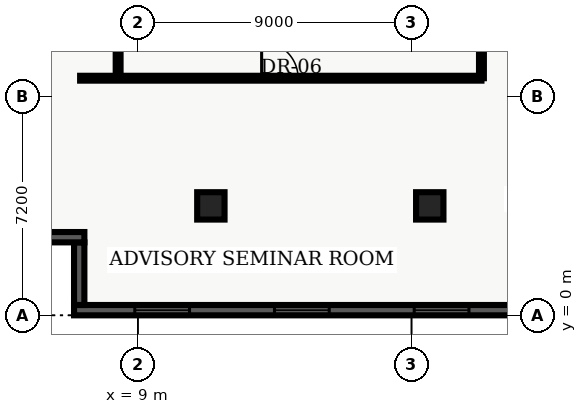
"""IFC4 building model, lengths in metres.
Left out: names, types, materials, properties, quantities, classifications, styles, units other than length and angle.
Written with IfcOpenShell. Run it as: python <this file> out.ifc"""

import sys

from ifc_helpers import new_model, entity, si_unit, converted_unit, direction, frame, origin_with_axes, origin_2d_with_axis, place, context, subcontext, project, spatial, polyline, rectangle, outline, extrude, element, fill, save


model = new_model("IFC4")
c1 = context("Model", 3, precision=1e-05, world=origin_with_axes(), true_north=direction((0.0, 1.0)))
c2 = subcontext(c1, "Body", "Model", "MODEL_VIEW")
j1 = project(units=[si_unit("LENGTHUNIT", "METRE"), converted_unit("PLANEANGLEUNIT", "DEGREE", entity("IfcPlaneAngleMeasure", 0.017), si_unit("PLANEANGLEUNIT", "RADIAN"), dimensions=[0, 0, 0, 0, 0, 0, 0])], contexts=[c1])
p1 = place(None, origin_with_axes())
s1 = spatial("IfcSite", under=j1, at=p1, CompositionType="ELEMENT")
p2 = place(p1, origin_with_axes())
s2 = spatial("IfcBuilding", under=s1, at=p2, CompositionType="ELEMENT")
p3 = place(p2, frame((0.0, 0.0, 240.3), z_axis=(0.0, 0.0, 1.0), x_axis=(1.0, 0.0, 0.0)))
s3 = spatial("IfcBuildingStorey", under=s2, at=p3, CompositionType="ELEMENT", Elevation=240.3)
for number, where, z_axis, x_axis in (
    (1, (11.4, 3.6, 0.0), (0.0, 0.0, 1.0), (1.0, 0.0, 0.0)),
    (2, (18.6, 3.6, 0.0), (0.0, 0.0, 1.0), (1.0, 0.0, 0.0)),
):
    element("IfcColumn", number, at=place(p3, frame(where, z_axis=z_axis, x_axis=x_axis)), inside=s3, PredefinedType="COLUMN", context=c2, shape_type="SweptSolid", body=[
        extrude(rectangle(XDim=0.9, YDim=0.9, at=origin_2d_with_axis()), origin_with_axes(), (0.0, 0.0, 1.0), 3.9),
    ])
p4 = place(p3, frame((7.1, 7.8, 0.0), z_axis=(0.0, 0.0, 1.0), x_axis=(1.0, 0.0, 0.0)))
e3 = element("IfcWall", 3, at=p4, inside=s3, PredefinedType="PARTITIONING", context=c2, shape_type="SweptSolid", body=[
    extrude(outline(polyline([(0.0, -0.08), (13.2, -0.08), (13.2, 0.08), (0.0, 0.08), (0.0, -0.08)])), origin_with_axes(), (0.0, 0.0, 1.0), 2.7),
])
p5 = place(p4, frame((6.57, 0.0, 0.0), z_axis=(0.0, 0.0, 1.0), x_axis=(1.0, 0.0, 0.0)))
e4 = element("IfcOpeningElement", 4, at=p5, cuts=e3, PredefinedType="OPENING", context=c2, shape_type="SweptSolid", body=[
    extrude(rectangle(XDim=1.2, YDim=0.18, at=origin_2d_with_axis()), origin_with_axes(), (0.0, 0.0, 1.0), 2.2),
])
p6 = place(p3, frame((20.3, 7.8, 0.0), z_axis=(0.0, 0.0, 1.0), x_axis=(0.0, 1.0, 0.0)))
e5 = element("IfcWall", 5, at=p6, inside=s3, PredefinedType="PARTITIONING", context=c2, shape_type="SweptSolid", body=[
    extrude(outline(polyline([(0.0, -0.08), (32.7, -0.08), (32.7, 0.08), (0.0, 0.08), (0.0, -0.08)])), origin_with_axes(), (0.0, 0.0, 1.0), 2.7),
])
p7 = place(p6, frame((14.55, 0.0, 0.0), z_axis=(0.0, 0.0, 1.0), x_axis=(1.0, 0.0, 0.0)))
e6 = element("IfcOpeningElement", 6, at=p7, cuts=e5, PredefinedType="OPENING", context=c2, shape_type="SweptSolid", body=[
    extrude(rectangle(XDim=0.9, YDim=0.18, at=origin_2d_with_axis()), origin_with_axes(), (0.0, 0.0, 1.0), 2.15),
])
p8 = place(p6, frame((18.86, 0.0, 0.0), z_axis=(0.0, 0.0, 1.0), x_axis=(1.0, 0.0, 0.0)))
e7 = element("IfcOpeningElement", 7, at=p8, cuts=e5, PredefinedType="OPENING", context=c2, shape_type="SweptSolid", body=[
    extrude(rectangle(XDim=1.0, YDim=0.18, at=origin_2d_with_axis()), origin_with_axes(), (0.0, 0.0, 1.0), 2.15),
])
p9 = place(p6, frame((24.276, 0.0, 0.0), z_axis=(0.0, 0.0, 1.0), x_axis=(1.0, 0.0, 0.0)))
e8 = element("IfcOpeningElement", 8, at=p9, cuts=e5, PredefinedType="OPENING", context=c2, shape_type="SweptSolid", body=[
    extrude(rectangle(XDim=1.0, YDim=0.18, at=origin_2d_with_axis()), origin_with_axes(), (0.0, 0.0, 1.0), 2.15),
])
p10 = place(p6, frame((27.491, 0.0, 0.0), z_axis=(0.0, 0.0, 1.0), x_axis=(1.0, 0.0, 0.0)))
e9 = element("IfcOpeningElement", 9, at=p10, cuts=e5, PredefinedType="OPENING", context=c2, shape_type="SweptSolid", body=[
    extrude(rectangle(XDim=1.0, YDim=0.18, at=origin_2d_with_axis()), origin_with_axes(), (0.0, 0.0, 1.0), 2.15),
])
p11 = place(p6, frame((5.775, 0.0, 0.0), z_axis=(0.0, 0.0, 1.0), x_axis=(1.0, 0.0, 0.0)))
e10 = element("IfcOpeningElement", 10, at=p11, cuts=e5, PredefinedType="OPENING", context=c2, shape_type="SweptSolid", body=[
    extrude(rectangle(XDim=1.05, YDim=0.18, at=origin_2d_with_axis()), origin_with_axes(), (0.0, 0.0, 1.0), 2.15),
])
p12 = place(p3, frame((8.35, 7.8, 0.0), z_axis=(0.0, 0.0, 1.0), x_axis=(0.0, 1.0, 0.0)))
e11 = element("IfcWall", 11, at=p12, inside=s3, PredefinedType="PARTITIONING", context=c2, shape_type="SweptSolid", body=[
    extrude(outline(polyline([(0.0, -0.08), (12.6, -0.08), (12.6, 0.08), (0.0, 0.08), (0.0, -0.08)])), origin_with_axes(), (0.0, 0.0, 1.0), 2.7),
])
p13 = place(p12, frame((2.932, 0.0, 0.0), z_axis=(0.0, 0.0, 1.0), x_axis=(1.0, 0.0, 0.0)))
e12 = element("IfcOpeningElement", 12, at=p13, cuts=e11, PredefinedType="OPENING", context=c2, shape_type="SweptSolid", body=[
    extrude(rectangle(XDim=1.0, YDim=0.18, at=origin_2d_with_axis()), origin_with_axes(), (0.0, 0.0, 1.0), 2.15),
])
p14 = place(p12, frame((9.127, 0.0, 0.0), z_axis=(0.0, 0.0, 1.0), x_axis=(1.0, 0.0, 0.0)))
e13 = element("IfcOpeningElement", 13, at=p14, cuts=e11, PredefinedType="OPENING", context=c2, shape_type="SweptSolid", body=[
    extrude(rectangle(XDim=1.0, YDim=0.18, at=origin_2d_with_axis()), origin_with_axes(), (0.0, 0.0, 1.0), 2.15),
])
p15 = place(p3, frame((49.46, 0.17, 0.0), z_axis=(0.0, 0.0, 1.0), x_axis=(-1.0, 0.0, 0.0)))
e14 = element("IfcWall", 14, at=p15, inside=s3, PredefinedType="SOLIDWALL", context=c2, shape_type="SweptSolid", body=[
    extrude(outline(polyline([(0.0, -0.17), (42.56, -0.17), (42.56, 0.17), (0.0, 0.17), (0.0, -0.17)])), origin_with_axes(), (0.0, 0.0, 1.0), 3.66),
])
p16 = place(p15, frame((2.898, 0.0, 0.45), z_axis=(0.0, 0.0, 1.0), x_axis=(1.0, 0.0, 0.0)))
e15 = element("IfcOpeningElement", 15, at=p16, cuts=e14, PredefinedType="OPENING", context=c2, shape_type="SweptSolid", body=[
    extrude(rectangle(XDim=1.8, YDim=0.36, at=origin_2d_with_axis()), origin_with_axes(), (0.0, 0.0, 1.0), 2.1),
])
p17 = place(p15, frame((7.493, 0.0, 0.45), z_axis=(0.0, 0.0, 1.0), x_axis=(1.0, 0.0, 0.0)))
e16 = element("IfcOpeningElement", 16, at=p17, cuts=e14, PredefinedType="OPENING", context=c2, shape_type="SweptSolid", body=[
    extrude(rectangle(XDim=1.8, YDim=0.36, at=origin_2d_with_axis()), origin_with_axes(), (0.0, 0.0, 1.0), 2.1),
])
p18 = place(p15, frame((12.089, 0.0, 0.45), z_axis=(0.0, 0.0, 1.0), x_axis=(1.0, 0.0, 0.0)))
e17 = element("IfcOpeningElement", 17, at=p18, cuts=e14, PredefinedType="OPENING", context=c2, shape_type="SweptSolid", body=[
    extrude(rectangle(XDim=1.8, YDim=0.36, at=origin_2d_with_axis()), origin_with_axes(), (0.0, 0.0, 1.0), 2.1),
])
p19 = place(p15, frame((16.684, 0.0, 0.45), z_axis=(0.0, 0.0, 1.0), x_axis=(1.0, 0.0, 0.0)))
e18 = element("IfcOpeningElement", 18, at=p19, cuts=e14, PredefinedType="OPENING", context=c2, shape_type="SweptSolid", body=[
    extrude(rectangle(XDim=1.8, YDim=0.36, at=origin_2d_with_axis()), origin_with_axes(), (0.0, 0.0, 1.0), 2.1),
])
p20 = place(p15, frame((21.28, 0.0, 0.45), z_axis=(0.0, 0.0, 1.0), x_axis=(1.0, 0.0, 0.0)))
e19 = element("IfcOpeningElement", 19, at=p20, cuts=e14, PredefinedType="OPENING", context=c2, shape_type="SweptSolid", body=[
    extrude(rectangle(XDim=1.8, YDim=0.36, at=origin_2d_with_axis()), origin_with_axes(), (0.0, 0.0, 1.0), 2.1),
])
p21 = place(p15, frame((25.876, 0.0, 0.45), z_axis=(0.0, 0.0, 1.0), x_axis=(1.0, 0.0, 0.0)))
e20 = element("IfcOpeningElement", 20, at=p21, cuts=e14, PredefinedType="OPENING", context=c2, shape_type="SweptSolid", body=[
    extrude(rectangle(XDim=1.8, YDim=0.36, at=origin_2d_with_axis()), origin_with_axes(), (0.0, 0.0, 1.0), 2.1),
])
p22 = place(p15, frame((30.471, 0.0, 0.45), z_axis=(0.0, 0.0, 1.0), x_axis=(1.0, 0.0, 0.0)))
e21 = element("IfcOpeningElement", 21, at=p22, cuts=e14, PredefinedType="OPENING", context=c2, shape_type="SweptSolid", body=[
    extrude(rectangle(XDim=1.8, YDim=0.36, at=origin_2d_with_axis()), origin_with_axes(), (0.0, 0.0, 1.0), 2.1),
])
p23 = place(p15, frame((35.067, 0.0, 0.45), z_axis=(0.0, 0.0, 1.0), x_axis=(1.0, 0.0, 0.0)))
e22 = element("IfcOpeningElement", 22, at=p23, cuts=e14, PredefinedType="OPENING", context=c2, shape_type="SweptSolid", body=[
    extrude(rectangle(XDim=1.8, YDim=0.36, at=origin_2d_with_axis()), origin_with_axes(), (0.0, 0.0, 1.0), 2.1),
])
p24 = place(p15, frame((39.662, 0.0, 0.45), z_axis=(0.0, 0.0, 1.0), x_axis=(1.0, 0.0, 0.0)))
e23 = element("IfcOpeningElement", 23, at=p24, cuts=e14, PredefinedType="OPENING", context=c2, shape_type="SweptSolid", body=[
    extrude(rectangle(XDim=1.8, YDim=0.36, at=origin_2d_with_axis()), origin_with_axes(), (0.0, 0.0, 1.0), 2.1),
])
p25 = place(p3, frame((7.07, 0.34, 0.0), z_axis=(0.0, 0.0, 1.0), x_axis=(0.0, 1.0, 0.0)))
e24 = element("IfcWall", 24, at=p25, inside=s3, PredefinedType="SOLIDWALL", context=c2, shape_type="SweptSolid", body=[
    extrude(outline(polyline([(0.0, -0.17), (2.06, -0.17), (2.06, 0.17), (0.0, 0.17), (0.0, -0.17)])), origin_with_axes(), (0.0, 0.0, 1.0), 3.66),
])
p26 = place(p3, frame((7.24, 2.57, 0.0), z_axis=(0.0, 0.0, 1.0), x_axis=(-1.0, 0.0, 0.0)))
e25 = element("IfcWall", 25, at=p26, inside=s3, PredefinedType="SOLIDWALL", context=c2, shape_type="SweptSolid", body=[
    extrude(outline(polyline([(0.0, -0.17), (2.74, -0.17), (2.74, 0.17), (0.0, 0.17), (0.0, -0.17)])), origin_with_axes(), (0.0, 0.0, 1.0), 3.66),
])
p27 = place(p4, frame((6.57, 0.0, 0.0), z_axis=(0.0, 0.0, 1.0), x_axis=(1.0, 0.0, 0.0)))
e26 = element("IfcDoor", 26, at=p27, inside=s3, OperationType="SINGLE_SWING_LEFT", PredefinedType="DOOR", context=c2, shape_type="SweptSolid", body=[
    extrude(rectangle(XDim=1.2, YDim=0.09, at=origin_2d_with_axis()), origin_with_axes(), (0.0, 0.0, 1.0), 2.2),
])
fill(e4, e26)
p28 = place(p15, frame((30.471, 0.0, 0.45), z_axis=(0.0, 0.0, 1.0), x_axis=(1.0, 0.0, 0.0)))
e27 = element("IfcWindow", 27, at=p28, inside=s3, PredefinedType="WINDOW", context=c2, shape_type="SweptSolid", body=[
    extrude(rectangle(XDim=1.8, YDim=0.09, at=origin_2d_with_axis()), origin_with_axes(), (0.0, 0.0, 1.0), 2.1),
])
fill(e21, e27)
p29 = place(p15, frame((35.067, 0.0, 0.45), z_axis=(0.0, 0.0, 1.0), x_axis=(1.0, 0.0, 0.0)))
e28 = element("IfcWindow", 28, at=p29, inside=s3, PredefinedType="WINDOW", context=c2, shape_type="SweptSolid", body=[
    extrude(rectangle(XDim=1.8, YDim=0.09, at=origin_2d_with_axis()), origin_with_axes(), (0.0, 0.0, 1.0), 2.1),
])
fill(e22, e28)
p30 = place(p15, frame((39.662, 0.0, 0.45), z_axis=(0.0, 0.0, 1.0), x_axis=(1.0, 0.0, 0.0)))
e29 = element("IfcWindow", 29, at=p30, inside=s3, PredefinedType="WINDOW", context=c2, shape_type="SweptSolid", body=[
    extrude(rectangle(XDim=1.8, YDim=0.09, at=origin_2d_with_axis()), origin_with_axes(), (0.0, 0.0, 1.0), 2.1),
])
fill(e23, e29)
save(model, sys.argv[1])
